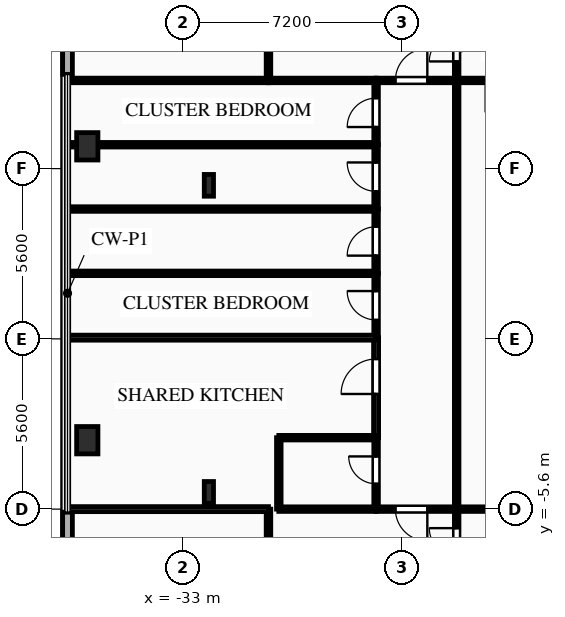
"""IFC4 building model, lengths in metres.
Left out: names, types, materials, properties, quantities, classifications, styles, units other than length and angle.
Written with IfcOpenShell. Run it as: python <this file> out.ifc"""

import sys

from ifc_helpers import new_model, si_unit, direction, frame, frame_2d, origin, origin_2d, place, context, subcontext, project, spatial, rectangle, i_section, extrude, element, fill, save


model = new_model("IFC4")
c1 = context("Model", 3, precision=1e-05, world=origin(), true_north=direction((0.0, 1.0)))
c2 = subcontext(c1, "Body", "Model", "MODEL_VIEW")
j1 = project(units=[si_unit("LENGTHUNIT", "METRE"), si_unit("PLANEANGLEUNIT", "RADIAN")], contexts=[c1])
p1 = place(None, origin())
s1 = spatial("IfcSite", under=j1, at=p1, CompositionType="ELEMENT")
p2 = place(p1, origin())
s2 = spatial("IfcBuilding", under=s1, at=p2, CompositionType="ELEMENT")
p3 = place(p2, frame((0.0, 0.0, 22.5)))
s3 = spatial("IfcBuildingStorey", under=s2, at=p3, CompositionType="ELEMENT", Elevation=22.5)
for number, where, z_axis, x_axis in (
    (1, (-36.15, -3.333, 0.0), (0.0, 0.0, 1.0), (1.0, 0.0, 0.0)),
    (2, (-36.15, 6.333, 0.0), (0.0, 0.0, 1.0), (1.0, 0.0, 0.0)),
):
    element("IfcColumn", number, at=place(p3, frame(where, z_axis=z_axis, x_axis=x_axis)), inside=s3, PredefinedType="COLUMN", context=c2, shape_type="SweptSolid", body=[
        extrude(rectangle(XDim=0.7, YDim=0.9, at=origin_2d()), origin(), (0.0, 0.0, 1.0), 4.5),
    ])
for number, where, z_axis, x_axis in (
    (3, (-32.15, 5.05, 0.0), (0.0, 0.0, 1.0), (1.0, 0.0, 0.0)),
    (4, (-32.15, -5.05, 0.0), (0.0, 0.0, 1.0), (1.0, 0.0, 0.0)),
):
    element("IfcColumn", number, at=place(p3, frame(where, z_axis=z_axis, x_axis=x_axis)), inside=s3, PredefinedType="COLUMN", context=c2, shape_type="SweptSolid", body=[
        extrude(i_section(OverallWidth=0.304, OverallDepth=0.716, WebThickness=0.021, FlangeThickness=0.04, FilletRadius=0.027, at=origin_2d()), origin(), (0.0, 0.0, 1.0), 4.5),
    ])
p4 = place(p3, frame((-36.8, -21.8, 0.0), z_axis=(0.0, 0.0, 1.0), x_axis=(0.0, 1.0, 0.0)))
e5 = element("IfcWall", 5, at=p4, inside=s3, PredefinedType="SOLIDWALL", context=c2, shape_type="SweptSolid", body=[
    extrude(rectangle(XDim=16.1, YDim=0.32, at=frame_2d((8.05, 0.0))), origin(), (0.0, 0.0, 1.0), 4.16),
])
p5 = place(p4, frame((5.067, 0.0, 0.85)))
e6 = element("IfcOpeningElement", 6, at=p5, cuts=e5, PredefinedType="OPENING", context=c2, shape_type="SweptSolid", body=[
    extrude(rectangle(XDim=2.6, YDim=2.4, at=frame_2d((1.3, 1.2))), frame((0.0, 0.17, 0.0), z_axis=(0.0, -1.0, 0.0), x_axis=(1.0, 0.0, 0.0)), (0.0, 0.0, 1.0), 0.34),
])
p6 = place(p3, frame((-36.8, 8.7, 0.0), z_axis=(0.0, 0.0, 1.0), x_axis=(0.0, 1.0, 0.0)))
e7 = element("IfcWall", 7, at=p6, inside=s3, PredefinedType="SOLIDWALL", context=c2, shape_type="SweptSolid", body=[
    extrude(rectangle(XDim=16.1, YDim=0.32, at=frame_2d((8.05, 0.0))), origin(), (0.0, 0.0, 1.0), 4.16),
])
p7 = place(p6, frame((8.485, 0.0, 0.85)))
e8 = element("IfcOpeningElement", 8, at=p7, cuts=e7, PredefinedType="OPENING", context=c2, shape_type="SweptSolid", body=[
    extrude(rectangle(XDim=2.6, YDim=2.4, at=frame_2d((1.3, 1.2))), frame((0.0, 0.17, 0.0), z_axis=(0.0, -1.0, 0.0), x_axis=(1.0, 0.0, 0.0)), (0.0, 0.0, 1.0), 0.34),
])
p8 = place(p3, frame((-24.0, 8.5, 0.0), z_axis=(0.0, 0.0, 1.0), x_axis=(0.0, 1.0, 0.0)))
e9 = element("IfcWall", 9, at=p8, inside=s3, PredefinedType="PARTITIONING", context=c2, shape_type="SweptSolid", body=[
    extrude(rectangle(XDim=2.15, YDim=0.15, at=frame_2d((1.075, 0.0))), origin(), (0.0, 0.0, 1.0), 4.16),
])
p9 = place(p8, frame((0.625, 0.0, 0.0)))
e10 = element("IfcOpeningElement", 10, at=p9, cuts=e9, PredefinedType="OPENING", context=c2, shape_type="SweptSolid", body=[
    extrude(rectangle(XDim=0.9, YDim=2.1, at=frame_2d((0.45, 1.05))), frame((0.0, 0.085, 0.0), z_axis=(0.0, -1.0, 0.0), x_axis=(1.0, 0.0, 0.0)), (0.0, 0.0, 1.0), 0.17),
])
p10 = place(p3, frame((-18.8, 8.5, 0.0), z_axis=(0.0, 0.0, 1.0), x_axis=(-1.0, 0.0, 0.0)))
e11 = element("IfcWall", 11, at=p10, inside=s3, PredefinedType="PARTITIONING", context=c2, shape_type="SweptSolid", body=[
    extrude(rectangle(XDim=5.2, YDim=0.15, at=frame_2d((2.6, 0.0))), origin(), (0.0, 0.0, 1.0), 4.16),
])
p11 = place(p10, frame((3.196, 0.0, 0.0)))
e12 = element("IfcOpeningElement", 12, at=p11, cuts=e11, PredefinedType="OPENING", context=c2, shape_type="SweptSolid", body=[
    extrude(rectangle(XDim=1.05, YDim=2.15, at=frame_2d((0.525, 1.075))), frame((0.0, 0.085, 0.0), z_axis=(0.0, -1.0, 0.0), x_axis=(1.0, 0.0, 0.0)), (0.0, 0.0, 1.0), 0.17),
])
p12 = place(p3, frame((-24.0, -7.75, 0.0), z_axis=(0.0, 0.0, 1.0), x_axis=(0.0, 1.0, 0.0)))
e13 = element("IfcWall", 13, at=p12, inside=s3, PredefinedType="PARTITIONING", context=c2, shape_type="SweptSolid", body=[
    extrude(rectangle(XDim=2.15, YDim=0.15, at=frame_2d((1.075, 0.0))), origin(), (0.0, 0.0, 1.0), 4.16),
])
p13 = place(p12, frame((0.625, 0.0, 0.0)))
e14 = element("IfcOpeningElement", 14, at=p13, cuts=e13, PredefinedType="OPENING", context=c2, shape_type="SweptSolid", body=[
    extrude(rectangle(XDim=0.9, YDim=2.1, at=frame_2d((0.45, 1.05))), frame((0.0, 0.085, 0.0), z_axis=(0.0, -1.0, 0.0), x_axis=(1.0, 0.0, 0.0)), (0.0, 0.0, 1.0), 0.17),
])
p14 = place(p3, frame((-24.0, -5.6, 0.0), z_axis=(0.0, 0.0, 1.0), x_axis=(1.0, 0.0, 0.0)))
e15 = element("IfcWall", 15, at=p14, inside=s3, PredefinedType="PARTITIONING", context=c2, shape_type="SweptSolid", body=[
    extrude(rectangle(XDim=5.2, YDim=0.15, at=frame_2d((2.6, 0.0))), origin(), (0.0, 0.0, 1.0), 4.16),
])
p15 = place(p3, frame((-26.65, 8.5, 0.0), z_axis=(0.0, 0.0, 1.0), x_axis=(1.0, 0.0, 0.0)))
e16 = element("IfcWall", 16, at=p15, inside=s3, PredefinedType="PARTITIONING", context=c2, shape_type="SweptSolid", body=[
    extrude(rectangle(XDim=2.65, YDim=0.15, at=frame_2d((1.325, 0.0))), origin(), (0.0, 0.0, 1.0), 4.16),
])
p16 = place(p15, frame((0.635, 0.0, 0.0)))
e17 = element("IfcOpeningElement", 17, at=p16, cuts=e16, PredefinedType="OPENING", context=c2, shape_type="SweptSolid", body=[
    extrude(rectangle(XDim=1.05, YDim=2.15, at=frame_2d((0.525, 1.075))), frame((0.0, 0.085, 0.0), z_axis=(0.0, -1.0, 0.0), x_axis=(1.0, 0.0, 0.0)), (0.0, 0.0, 1.0), 0.17),
])
p17 = place(p3, frame((-24.0, -5.6, 0.0), z_axis=(0.0, 0.0, 1.0), x_axis=(-1.0, 0.0, 0.0)))
e18 = element("IfcWall", 18, at=p17, inside=s3, PredefinedType="PARTITIONING", context=c2, shape_type="SweptSolid", body=[
    extrude(rectangle(XDim=2.65, YDim=0.15, at=frame_2d((1.325, 0.0))), origin(), (0.0, 0.0, 1.0), 4.16),
])
p18 = place(p17, frame((0.965, 0.0, 0.0)))
e19 = element("IfcOpeningElement", 19, at=p18, cuts=e18, PredefinedType="OPENING", context=c2, shape_type="SweptSolid", body=[
    extrude(rectangle(XDim=1.05, YDim=2.15, at=frame_2d((0.525, 1.075))), frame((0.0, 0.085, 0.0), z_axis=(0.0, -1.0, 0.0), x_axis=(1.0, 0.0, 0.0)), (0.0, 0.0, 1.0), 0.17),
])
p19 = place(p3, frame((-26.65, -5.6, 0.0), z_axis=(0.0, 0.0, 1.0), x_axis=(0.0, 1.0, 0.0)))
e20 = element("IfcWall", 20, at=p19, inside=s3, PredefinedType="PLUMBINGWALL", context=c2, shape_type="SweptSolid", body=[
    extrude(rectangle(XDim=2.35, YDim=0.15, at=frame_2d((1.175, 0.0))), origin(), (0.0, 0.0, 1.0), 4.16),
])
p20 = place(p19, frame((0.834, 0.0, 0.0)))
e21 = element("IfcOpeningElement", 21, at=p20, cuts=e20, PredefinedType="OPENING", context=c2, shape_type="SweptSolid", body=[
    extrude(rectangle(XDim=0.9, YDim=2.1, at=frame_2d((0.45, 1.05))), frame((0.0, 0.085, 0.0), z_axis=(0.0, -1.0, 0.0), x_axis=(1.0, 0.0, 0.0)), (0.0, 0.0, 1.0), 0.17),
])
p21 = place(p3, frame((-26.65, -3.25, 0.0), z_axis=(0.0, 0.0, 1.0), x_axis=(0.0, 1.0, 0.0)))
e22 = element("IfcWall", 22, at=p21, inside=s3, PredefinedType="PARTITIONING", context=c2, shape_type="SweptSolid", body=[
    extrude(rectangle(XDim=3.29, YDim=0.165, at=frame_2d((1.645, 0.0))), origin(), (0.0, 0.0, 1.0), 4.16),
])
p22 = place(p21, frame((1.438, 0.0, 0.0)))
e23 = element("IfcOpeningElement", 23, at=p22, cuts=e22, PredefinedType="OPENING", context=c2, shape_type="SweptSolid", body=[
    extrude(rectangle(XDim=1.15, YDim=2.15, at=frame_2d((0.575, 1.075))), frame((0.0, 0.093, 0.0), z_axis=(0.0, -1.0, 0.0), x_axis=(1.0, 0.0, 0.0)), (0.0, 0.0, 1.0), 0.185),
])
p23 = place(p3, frame((-26.65, 0.04, 0.0), z_axis=(0.0, 0.0, 1.0), x_axis=(0.0, 1.0, 0.0)))
e24 = element("IfcWall", 24, at=p23, inside=s3, PredefinedType="PARTITIONING", context=c2, shape_type="SweptSolid", body=[
    extrude(rectangle(XDim=2.115, YDim=0.15, at=frame_2d((1.058, 0.0))), origin(), (0.0, 0.0, 1.0), 4.16),
])
p24 = place(p23, frame((0.583, 0.0, 0.0)))
e25 = element("IfcOpeningElement", 25, at=p24, cuts=e24, PredefinedType="OPENING", context=c2, shape_type="SweptSolid", body=[
    extrude(rectangle(XDim=0.95, YDim=2.1, at=frame_2d((0.475, 1.05))), frame((0.0, 0.085, 0.0), z_axis=(0.0, -1.0, 0.0), x_axis=(1.0, 0.0, 0.0)), (0.0, 0.0, 1.0), 0.17),
])
p25 = place(p3, frame((-26.65, 2.155, 0.0), z_axis=(0.0, 0.0, 1.0), x_axis=(0.0, 1.0, 0.0)))
e26 = element("IfcWall", 26, at=p25, inside=s3, PredefinedType="PARTITIONING", context=c2, shape_type="SweptSolid", body=[
    extrude(rectangle(XDim=2.115, YDim=0.15, at=frame_2d((1.058, 0.0))), origin(), (0.0, 0.0, 1.0), 4.16),
])
p26 = place(p25, frame((0.583, 0.0, 0.0)))
e27 = element("IfcOpeningElement", 27, at=p26, cuts=e26, PredefinedType="OPENING", context=c2, shape_type="SweptSolid", body=[
    extrude(rectangle(XDim=0.95, YDim=2.1, at=frame_2d((0.475, 1.05))), frame((0.0, 0.085, 0.0), z_axis=(0.0, -1.0, 0.0), x_axis=(1.0, 0.0, 0.0)), (0.0, 0.0, 1.0), 0.17),
])
p27 = place(p3, frame((-26.65, 4.27, 0.0), z_axis=(0.0, 0.0, 1.0), x_axis=(0.0, 1.0, 0.0)))
e28 = element("IfcWall", 28, at=p27, inside=s3, PredefinedType="PARTITIONING", context=c2, shape_type="SweptSolid", body=[
    extrude(rectangle(XDim=2.115, YDim=0.15, at=frame_2d((1.058, 0.0))), origin(), (0.0, 0.0, 1.0), 4.16),
])
p28 = place(p27, frame((0.583, 0.0, 0.0)))
e29 = element("IfcOpeningElement", 29, at=p28, cuts=e28, PredefinedType="OPENING", context=c2, shape_type="SweptSolid", body=[
    extrude(rectangle(XDim=0.95, YDim=2.1, at=frame_2d((0.475, 1.05))), frame((0.0, 0.085, 0.0), z_axis=(0.0, -1.0, 0.0), x_axis=(1.0, 0.0, 0.0)), (0.0, 0.0, 1.0), 0.17),
])
p29 = place(p3, frame((-26.65, 6.385, 0.0), z_axis=(0.0, 0.0, 1.0), x_axis=(0.0, 1.0, 0.0)))
e30 = element("IfcWall", 30, at=p29, inside=s3, PredefinedType="PARTITIONING", context=c2, shape_type="SweptSolid", body=[
    extrude(rectangle(XDim=2.115, YDim=0.15, at=frame_2d((1.058, 0.0))), origin(), (0.0, 0.0, 1.0), 4.16),
])
p30 = place(p29, frame((0.583, 0.0, 0.0)))
e31 = element("IfcOpeningElement", 31, at=p30, cuts=e30, PredefinedType="OPENING", context=c2, shape_type="SweptSolid", body=[
    extrude(rectangle(XDim=0.95, YDim=2.1, at=frame_2d((0.475, 1.05))), frame((0.0, 0.085, 0.0), z_axis=(0.0, -1.0, 0.0), x_axis=(1.0, 0.0, 0.0)), (0.0, 0.0, 1.0), 0.17),
])
p31 = place(p3, frame((-24.0, 8.5, 0.0), z_axis=(0.0, 0.0, 1.0), x_axis=(0.0, -1.0, 0.0)))
e32 = element("IfcWall", 32, at=p31, inside=s3, PredefinedType="PARTITIONING", context=c2, shape_type="SweptSolid", body=[
    extrude(rectangle(XDim=14.1, YDim=0.15, at=frame_2d((7.05, 0.0))), origin(), (0.0, 0.0, 1.0), 4.16),
])
p32 = place(p3, frame((-30.19, 8.5, 0.0), z_axis=(0.0, 0.0, 1.0), x_axis=(0.0, 1.0, 0.0)))
e33 = element("IfcWall", 33, at=p32, inside=s3, PredefinedType="PARTITIONING", context=c2, shape_type="SweptSolid", body=[
    extrude(rectangle(XDim=16.3, YDim=0.15, at=frame_2d((8.15, 0.0))), origin(), (0.0, 0.0, 1.0), 4.16),
])
p33 = place(p32, frame((2.341, 0.0, 0.0)))
e34 = element("IfcOpeningElement", 34, at=p33, cuts=e33, PredefinedType="OPENING", context=c2, shape_type="SweptSolid", body=[
    extrude(rectangle(XDim=1.05, YDim=2.15, at=frame_2d((0.525, 1.075))), frame((0.0, 0.085, 0.0), z_axis=(0.0, -1.0, 0.0), x_axis=(1.0, 0.0, 0.0)), (0.0, 0.0, 1.0), 0.17),
])
p34 = place(p3, frame((-26.65, 8.5, 0.0), z_axis=(0.0, 0.0, 1.0), x_axis=(-1.0, 0.0, 0.0)))
e35 = element("IfcWall", 35, at=p34, inside=s3, PredefinedType="PARTITIONING", context=c2, shape_type="SweptSolid", body=[
    extrude(rectangle(XDim=3.54, YDim=0.15, at=frame_2d((1.77, 0.0))), origin(), (0.0, 0.0, 1.0), 4.16),
])
p35 = place(p3, frame((-30.19, 8.5, 0.0), z_axis=(0.0, 0.0, 1.0), x_axis=(-1.0, 0.0, 0.0)))
e36 = element("IfcWall", 36, at=p35, inside=s3, PredefinedType="PARTITIONING", context=c2, shape_type="SweptSolid", body=[
    extrude(rectangle(XDim=6.61, YDim=0.15, at=frame_2d((3.305, 0.0))), origin(), (0.0, 0.0, 1.0), 4.16),
])
p36 = place(p3, frame((-30.19, -21.8, 0.0), z_axis=(0.0, 0.0, 1.0), x_axis=(0.0, 1.0, 0.0)))
e37 = element("IfcWall", 37, at=p36, inside=s3, PredefinedType="PARTITIONING", context=c2, shape_type="SweptSolid", body=[
    extrude(rectangle(XDim=16.2, YDim=0.15, at=frame_2d((8.1, 0.0))), origin(), (0.0, 0.0, 1.0), 4.16),
])
p37 = place(p36, frame((11.073, 0.0, 0.0)))
e38 = element("IfcOpeningElement", 38, at=p37, cuts=e37, PredefinedType="OPENING", context=c2, shape_type="SweptSolid", body=[
    extrude(rectangle(XDim=1.05, YDim=2.15, at=frame_2d((0.525, 1.075))), frame((0.0, 0.085, 0.0), z_axis=(0.0, -1.0, 0.0), x_axis=(1.0, 0.0, 0.0)), (0.0, 0.0, 1.0), 0.17),
])
p38 = place(p3, frame((-29.85, -5.6, 0.0), z_axis=(0.0, 0.0, 1.0), x_axis=(1.0, 0.0, 0.0)))
e39 = element("IfcWall", 39, at=p38, inside=s3, PredefinedType="PLUMBINGWALL", context=c2, shape_type="SweptSolid", body=[
    extrude(rectangle(XDim=3.2, YDim=0.15, at=frame_2d((1.6, 0.0))), origin(), (0.0, 0.0, 1.0), 4.16),
])
p39 = place(p3, frame((-36.8, -5.6, 0.0), z_axis=(0.0, 0.0, 1.0), x_axis=(1.0, 0.0, 0.0)))
e40 = element("IfcWall", 40, at=p39, inside=s3, PredefinedType="PARTITIONING", context=c2, shape_type="SweptSolid", body=[
    extrude(rectangle(XDim=6.61, YDim=0.165, at=frame_2d((3.305, 0.0))), origin(), (0.0, 0.0, 1.0), 4.16),
])
p40 = place(p3, frame((-29.85, -3.25, 0.0), z_axis=(0.0, 0.0, 1.0), x_axis=(1.0, 0.0, 0.0)))
e41 = element("IfcWall", 41, at=p40, inside=s3, PredefinedType="PLUMBINGWALL", context=c2, shape_type="SweptSolid", body=[
    extrude(rectangle(XDim=3.2, YDim=0.15, at=frame_2d((1.6, 0.0))), origin(), (0.0, 0.0, 1.0), 4.16),
])
p41 = place(p3, frame((-29.85, -5.6, 0.0), z_axis=(0.0, 0.0, 1.0), x_axis=(0.0, 1.0, 0.0)))
e42 = element("IfcWall", 42, at=p41, inside=s3, PredefinedType="PLUMBINGWALL", context=c2, shape_type="SweptSolid", body=[
    extrude(rectangle(XDim=2.35, YDim=0.15, at=frame_2d((1.175, 0.0))), origin(), (0.0, 0.0, 1.0), 4.16),
])
p42 = place(p3, frame((-36.8, 0.04, 0.0), z_axis=(0.0, 0.0, 1.0), x_axis=(1.0, 0.0, 0.0)))
e43 = element("IfcWall", 43, at=p42, inside=s3, PredefinedType="PARTITIONING", context=c2, shape_type="SweptSolid", body=[
    extrude(rectangle(XDim=10.15, YDim=0.165, at=frame_2d((5.075, 0.0))), origin(), (0.0, 0.0, 1.0), 4.16),
])
p43 = place(p3, frame((-36.8, 2.155, 0.0), z_axis=(0.0, 0.0, 1.0), x_axis=(1.0, 0.0, 0.0)))
e44 = element("IfcWall", 44, at=p43, inside=s3, PredefinedType="PARTITIONING", context=c2, shape_type="SweptSolid", body=[
    extrude(rectangle(XDim=10.15, YDim=0.15, at=frame_2d((5.075, 0.0))), origin(), (0.0, 0.0, 1.0), 4.16),
])
p44 = place(p3, frame((-36.8, 4.27, 0.0), z_axis=(0.0, 0.0, 1.0), x_axis=(1.0, 0.0, 0.0)))
e45 = element("IfcWall", 45, at=p44, inside=s3, PredefinedType="PARTITIONING", context=c2, shape_type="SweptSolid", body=[
    extrude(rectangle(XDim=10.15, YDim=0.15, at=frame_2d((5.075, 0.0))), origin(), (0.0, 0.0, 1.0), 3.645),
])
p45 = place(p3, frame((-36.8, 6.385, 0.0), z_axis=(0.0, 0.0, 1.0), x_axis=(1.0, 0.0, 0.0)))
e46 = element("IfcWall", 46, at=p45, inside=s3, PredefinedType="PARTITIONING", context=c2, shape_type="SweptSolid", body=[
    extrude(rectangle(XDim=10.15, YDim=0.15, at=frame_2d((5.075, 0.0))), origin(), (0.0, 0.0, 1.0), 3.545),
])
p46 = place(p9, origin())
e47 = element("IfcDoor", 47, at=p46, inside=s3, OperationType="SINGLE_SWING_LEFT", PredefinedType="DOOR", context=c2, shape_type="SweptSolid", body=[
    extrude(rectangle(XDim=0.9, YDim=2.1, at=frame_2d((0.45, 1.05))), frame((0.0, 0.025, 0.0), z_axis=(0.0, -1.0, 0.0), x_axis=(1.0, 0.0, 0.0)), (0.0, 0.0, 1.0), 0.05),
])
fill(e10, e47)
p47 = place(p13, origin())
e48 = element("IfcDoor", 48, at=p47, inside=s3, OperationType="SINGLE_SWING_RIGHT", PredefinedType="DOOR", context=c2, shape_type="SweptSolid", body=[
    extrude(rectangle(XDim=0.9, YDim=2.1, at=frame_2d((0.45, 1.05))), frame((0.0, 0.025, 0.0), z_axis=(0.0, -1.0, 0.0), x_axis=(1.0, 0.0, 0.0)), (0.0, 0.0, 1.0), 0.05),
])
fill(e14, e48)
p48 = place(p16, origin())
e49 = element("IfcDoor", 49, at=p48, inside=s3, OperationType="SINGLE_SWING_RIGHT", PredefinedType="DOOR", context=c2, shape_type="SweptSolid", body=[
    extrude(rectangle(XDim=1.05, YDim=2.15, at=frame_2d((0.525, 1.075))), frame((0.0, 0.025, 0.0), z_axis=(0.0, -1.0, 0.0), x_axis=(1.0, 0.0, 0.0)), (0.0, 0.0, 1.0), 0.05),
])
fill(e17, e49)
p49 = place(p18, origin())
e50 = element("IfcDoor", 50, at=p49, inside=s3, OperationType="SINGLE_SWING_LEFT", PredefinedType="DOOR", context=c2, shape_type="SweptSolid", body=[
    extrude(rectangle(XDim=1.05, YDim=2.15, at=frame_2d((0.525, 1.075))), frame((0.0, 0.025, 0.0), z_axis=(0.0, -1.0, 0.0), x_axis=(1.0, 0.0, 0.0)), (0.0, 0.0, 1.0), 0.05),
])
fill(e19, e50)
p50 = place(p20, origin())
e51 = element("IfcDoor", 51, at=p50, inside=s3, OperationType="SINGLE_SWING_RIGHT", PredefinedType="DOOR", context=c2, shape_type="SweptSolid", body=[
    extrude(rectangle(XDim=0.9, YDim=2.1, at=frame_2d((0.45, 1.05))), frame((0.0, 0.025, 0.0), z_axis=(0.0, -1.0, 0.0), x_axis=(1.0, 0.0, 0.0)), (0.0, 0.0, 1.0), 0.05),
])
fill(e21, e51)
p51 = place(p22, origin())
e52 = element("IfcDoor", 52, at=p51, inside=s3, OperationType="SINGLE_SWING_LEFT", PredefinedType="DOOR", context=c2, shape_type="SweptSolid", body=[
    extrude(rectangle(XDim=1.15, YDim=2.15, at=frame_2d((0.575, 1.075))), frame((0.0, 0.025, 0.0), z_axis=(0.0, -1.0, 0.0), x_axis=(1.0, 0.0, 0.0)), (0.0, 0.0, 1.0), 0.05),
])
fill(e23, e52)
p52 = place(p24, origin())
e53 = element("IfcDoor", 53, at=p52, inside=s3, OperationType="SINGLE_SWING_RIGHT", PredefinedType="DOOR", context=c2, shape_type="SweptSolid", body=[
    extrude(rectangle(XDim=0.95, YDim=2.1, at=frame_2d((0.475, 1.05))), frame((0.0, 0.025, 0.0), z_axis=(0.0, -1.0, 0.0), x_axis=(1.0, 0.0, 0.0)), (0.0, 0.0, 1.0), 0.05),
])
fill(e25, e53)
p53 = place(p26, origin())
e54 = element("IfcDoor", 54, at=p53, inside=s3, OperationType="SINGLE_SWING_LEFT", PredefinedType="DOOR", context=c2, shape_type="SweptSolid", body=[
    extrude(rectangle(XDim=0.95, YDim=2.1, at=frame_2d((0.475, 1.05))), frame((0.0, 0.025, 0.0), z_axis=(0.0, -1.0, 0.0), x_axis=(1.0, 0.0, 0.0)), (0.0, 0.0, 1.0), 0.05),
])
fill(e27, e54)
p54 = place(p28, origin())
e55 = element("IfcDoor", 55, at=p54, inside=s3, OperationType="SINGLE_SWING_RIGHT", PredefinedType="DOOR", context=c2, shape_type="SweptSolid", body=[
    extrude(rectangle(XDim=0.95, YDim=2.1, at=frame_2d((0.475, 1.05))), frame((0.0, 0.025, 0.0), z_axis=(0.0, -1.0, 0.0), x_axis=(1.0, 0.0, 0.0)), (0.0, 0.0, 1.0), 0.05),
])
fill(e29, e55)
p55 = place(p30, origin())
e56 = element("IfcDoor", 56, at=p55, inside=s3, OperationType="SINGLE_SWING_LEFT", PredefinedType="DOOR", context=c2, shape_type="SweptSolid", body=[
    extrude(rectangle(XDim=0.95, YDim=2.1, at=frame_2d((0.475, 1.05))), frame((0.0, 0.025, 0.0), z_axis=(0.0, -1.0, 0.0), x_axis=(1.0, 0.0, 0.0)), (0.0, 0.0, 1.0), 0.05),
])
fill(e31, e56)
save(model, sys.argv[1])
